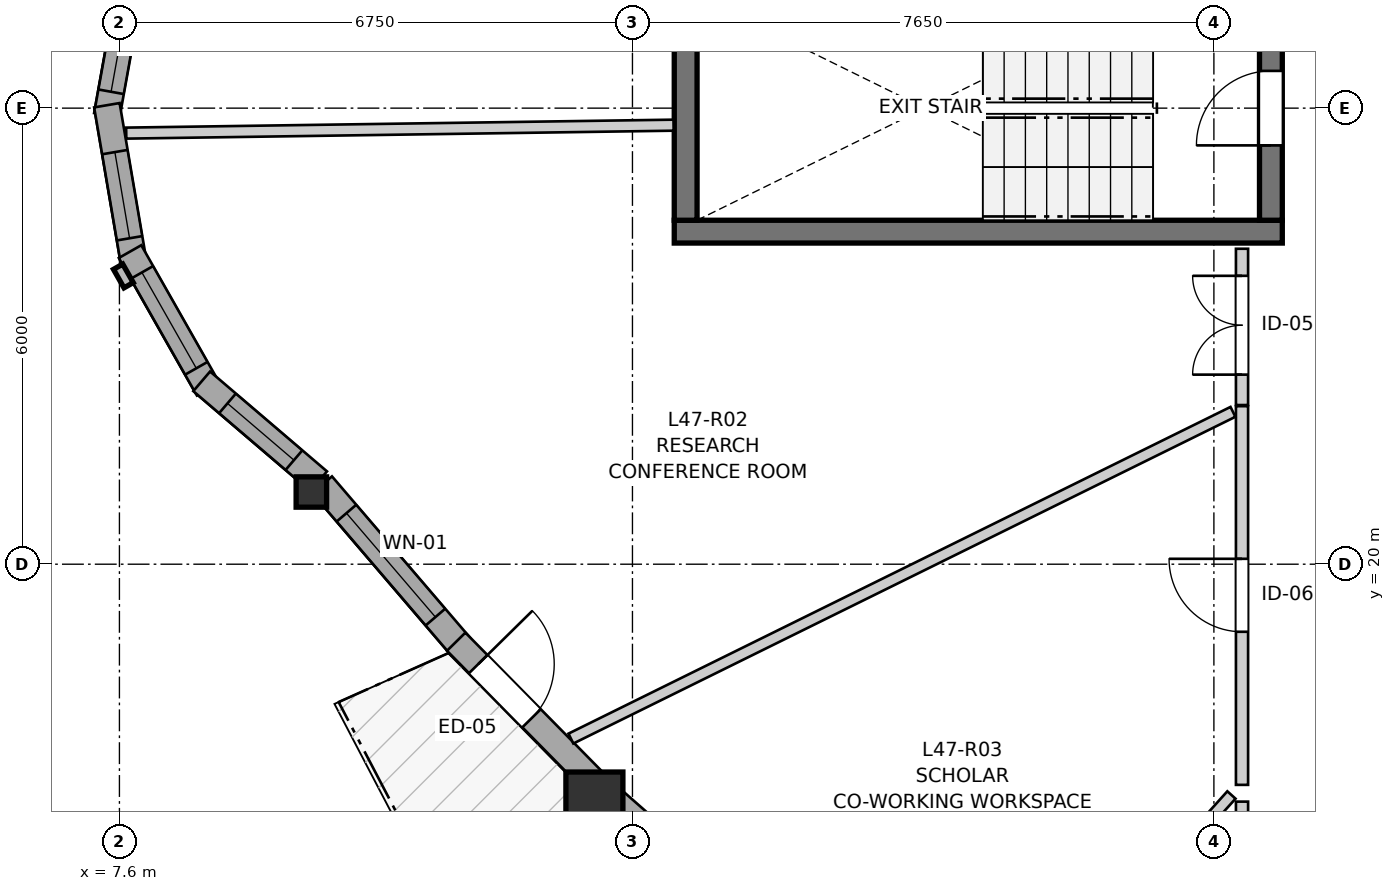
"""IFC4 building model, lengths in metres.
Left out: names, types, materials, properties, quantities, classifications, styles, units other than length and angle.
Written with IfcOpenShell. Run it as: python <this file> out.ifc"""

import sys

from ifc_helpers import new_model, si_unit, direction, frame, frame_2d, origin, origin_2d, place, context, subcontext, project, spatial, rectangle, i_section, extrude, source, transform, mapped, element, fill, save


model = new_model("IFC4")
c1 = context("Model", 3, precision=1e-05, world=origin(), true_north=direction((0.0, 1.0)))
c2 = subcontext(c1, "Body", "Model", "MODEL_VIEW")
j1 = project(units=[si_unit("LENGTHUNIT", "METRE"), si_unit("PLANEANGLEUNIT", "RADIAN")], contexts=[c1])
p1 = place(None, origin())
s1 = spatial("IfcSite", under=j1, at=p1, CompositionType="ELEMENT")
p2 = place(p1, origin())
s2 = spatial("IfcBuilding", under=s1, at=p2, CompositionType="ELEMENT")
p3 = place(p2, frame((0.0, 0.0, 158.6)))
s3 = spatial("IfcBuildingStorey", under=s2, at=p3, CompositionType="ELEMENT", Elevation=158.6)
p4 = place(p3, frame((14.9, 24.375, 0.0), z_axis=(0.0, 0.0, 1.0), x_axis=(1.0, 0.0, 0.0)))
e1 = element("IfcWall", 1, at=p4, inside=s3, PredefinedType="SHEAR", context=c2, shape_type="SweptSolid", body=[
    extrude(rectangle(XDim=8.0, YDim=0.3, at=frame_2d((4.0, 0.0))), origin(), (0.0, 0.0, 1.0), 2.95),
])
p5 = place(p3, frame((15.05, 27.475, 0.0), z_axis=(0.0, 0.0, 1.0), x_axis=(0.0, -1.0, 0.0)))
e2 = element("IfcWall", 2, at=p5, inside=s3, PredefinedType="SHEAR", context=c2, shape_type="SweptSolid", body=[
    extrude(rectangle(XDim=2.95, YDim=0.3, at=frame_2d((1.475, 0.0))), origin(), (0.0, 0.0, 1.0), 2.95),
])
p6 = place(p3, frame((22.75, 24.525, 0.0), z_axis=(0.0, 0.0, 1.0), x_axis=(0.0, 1.0, 0.0)))
e3 = element("IfcWall", 3, at=p6, inside=s3, PredefinedType="SHEAR", context=c2, shape_type="SweptSolid", body=[
    extrude(rectangle(XDim=2.95, YDim=0.3, at=frame_2d((1.475, 0.0))), origin(), (0.0, 0.0, 1.0), 2.95),
])
p7 = place(p6, frame((0.985, 0.0, 0.0)))
e4 = element("IfcOpeningElement", 4, at=p7, cuts=e3, PredefinedType="OPENING", context=c2, shape_type="SweptSolid", body=[
    extrude(rectangle(XDim=0.98, YDim=2.15, at=frame_2d((0.49, 1.075))), frame((0.0, 0.16, 0.0), z_axis=(0.0, -1.0, 0.0), x_axis=(1.0, 0.0, 0.0)), (0.0, 0.0, 1.0), 0.32),
])
m1 = source(origin(), c2, "Body", "SweptSolid", [
    extrude(i_section(OverallWidth=0.401, OverallDepth=0.399, WebThickness=0.023, FlangeThickness=0.036, FilletRadius=0.015, at=origin_2d()), origin(), (0.0, 0.0, 1.0), 2.95),
])
p8 = place(p3, frame((10.125, 20.95, 0.0), z_axis=(0.0, 0.0, 1.0), x_axis=(1.0, 0.0, 0.0)))
e5 = element("IfcColumn", 5, at=p8, inside=s3, PredefinedType="PILASTER", context=c2, shape_type="MappedRepresentation", body=[
    mapped(m1, transform((0.0, 0.0, 0.0), x_axis=(1.0, 0.0, 0.0), y_axis=(0.0, 1.0, 0.0), z_axis=(0.0, 0.0, 1.0), scale=1.0)),
])
m2 = source(origin(), c2, "Body", "SweptSolid", [
    extrude(rectangle(XDim=0.75, YDim=0.75, at=origin_2d()), origin(), (0.0, 0.0, 1.0), 2.95),
])
p9 = place(p3, frame((13.849, 16.891, 0.0), z_axis=(0.0, 0.0, 1.0), x_axis=(1.0, 0.0, 0.0)))
e6 = element("IfcColumn", 6, at=p9, inside=s3, PredefinedType="COLUMN", context=c2, shape_type="MappedRepresentation", body=[
    mapped(m2, transform((0.0, 0.0, 0.0), x_axis=(1.0, 0.0, 0.0), y_axis=(0.0, 1.0, 0.0), z_axis=(0.0, 0.0, 1.0), scale=1.0)),
])
p10 = place(p3, frame((7.804, 27.953, 0.0), z_axis=(0.0, 0.0, 1.0), x_axis=(-0.177605215389, -0.984101817632, 0.0)))
e7 = element("IfcWall", 7, at=p10, inside=s3, PredefinedType="SOLIDWALL", context=c2, shape_type="SweptSolid", body=[
    extrude(rectangle(XDim=2.081, YDim=0.34, at=frame_2d((1.041, 0.0))), origin(), (0.0, 0.0, 1.0), 2.53),
])
p11 = place(p10, frame((0.316, 0.0, 0.82)))
e8 = element("IfcOpeningElement", 8, at=p11, cuts=e7, PredefinedType="OPENING", context=c2, shape_type="SweptSolid", body=[
    extrude(rectangle(XDim=1.45, YDim=1.25, at=frame_2d((0.725, 0.625))), frame((0.0, 0.18, 0.0), z_axis=(0.0, -1.0, 0.0), x_axis=(1.0, 0.0, 0.0)), (0.0, 0.0, 1.0), 0.36),
])
p12 = place(p3, frame((7.435, 26.038, 0.0), z_axis=(0.0, 0.0, 1.0), x_axis=(0.168107405166, -0.985768685001, 0.0)))
e9 = element("IfcWall", 9, at=p12, inside=s3, PredefinedType="SOLIDWALL", context=c2, shape_type="SweptSolid", body=[
    extrude(rectangle(XDim=2.081, YDim=0.34, at=frame_2d((1.041, 0.0))), origin(), (0.0, 0.0, 1.0), 2.53),
])
p13 = place(p12, frame((0.625, 0.0, 0.82)))
e10 = element("IfcOpeningElement", 10, at=p13, cuts=e9, PredefinedType="OPENING", context=c2, shape_type="SweptSolid", body=[
    extrude(rectangle(XDim=1.15, YDim=1.2, at=frame_2d((0.575, 0.6))), frame((0.0, 0.18, 0.0), z_axis=(0.0, -1.0, 0.0), x_axis=(1.0, 0.0, 0.0)), (0.0, 0.0, 1.0), 0.36),
])
p14 = place(p3, frame((7.74, 24.113, 0.0), z_axis=(0.0, 0.0, 1.0), x_axis=(0.493660675866, -0.869654607936, 0.0)))
e11 = element("IfcWall", 11, at=p14, inside=s3, PredefinedType="SOLIDWALL", context=c2, shape_type="SweptSolid", body=[
    extrude(rectangle(XDim=2.081, YDim=0.34, at=frame_2d((1.041, 0.0))), origin(), (0.0, 0.0, 1.0), 2.53),
])
p15 = place(p14, frame((0.316, 0.0, 0.82)))
e12 = element("IfcOpeningElement", 12, at=p15, cuts=e11, PredefinedType="OPENING", context=c2, shape_type="SweptSolid", body=[
    extrude(rectangle(XDim=1.45, YDim=1.25, at=frame_2d((0.725, 0.625))), frame((0.0, 0.18, 0.0), z_axis=(0.0, -1.0, 0.0), x_axis=(1.0, 0.0, 0.0)), (0.0, 0.0, 1.0), 0.36),
])
p16 = place(p3, frame((8.682, 22.406, 0.0), z_axis=(0.0, 0.0, 1.0), x_axis=(0.760269373804, -0.649607942728, 0.0)))
e13 = element("IfcWall", 13, at=p16, inside=s3, PredefinedType="SOLIDWALL", context=c2, shape_type="SweptSolid", body=[
    extrude(rectangle(XDim=2.023, YDim=0.34, at=frame_2d((1.012, 0.0))), origin(), (0.0, 0.0, 1.0), 2.53),
])
p17 = place(p16, frame((0.447, 0.0, 0.82)))
e14 = element("IfcOpeningElement", 14, at=p17, cuts=e13, PredefinedType="OPENING", context=c2, shape_type="SweptSolid", body=[
    extrude(rectangle(XDim=1.15, YDim=1.2, at=frame_2d((0.575, 0.6))), frame((0.0, 0.18, 0.0), z_axis=(0.0, -1.0, 0.0), x_axis=(1.0, 0.0, 0.0)), (0.0, 0.0, 1.0), 0.36),
])
p18 = place(p3, frame((10.267, 21.045, 0.0), z_axis=(0.0, 0.0, 1.0), x_axis=(0.650339388137, -0.759643785098, 0.0)))
e15 = element("IfcWall", 15, at=p18, inside=s3, PredefinedType="SOLIDWALL", context=c2, shape_type="SweptSolid", body=[
    extrude(rectangle(XDim=2.803, YDim=0.34, at=frame_2d((1.402, 0.0))), origin(), (0.0, 0.0, 1.0), 2.53),
])
p19 = place(p18, frame((0.491, 0.0, 0.82)))
e16 = element("IfcOpeningElement", 16, at=p19, cuts=e15, PredefinedType="OPENING", context=c2, shape_type="SweptSolid", body=[
    extrude(rectangle(XDim=1.8, YDim=1.45, at=frame_2d((0.9, 0.725))), frame((0.0, 0.18, 0.0), z_axis=(0.0, -1.0, 0.0), x_axis=(1.0, 0.0, 0.0)), (0.0, 0.0, 1.0), 0.36),
])
p20 = place(p3, frame((12.031, 18.98, 0.0), z_axis=(0.0, 0.0, 1.0), x_axis=(0.701518749222, -0.712650997677, 0.0)))
e17 = element("IfcWall", 17, at=p20, inside=s3, PredefinedType="SOLIDWALL", context=c2, shape_type="SweptSolid", body=[
    extrude(rectangle(XDim=2.61, YDim=0.34, at=frame_2d((1.305, 0.0))), origin(), (0.0, 0.0, 1.0), 2.53),
])
p21 = place(p20, frame((0.413, 0.0, 0.0)))
e18 = element("IfcOpeningElement", 18, at=p21, cuts=e17, PredefinedType="OPENING", context=c2, shape_type="SweptSolid", body=[
    extrude(rectangle(XDim=1.0, YDim=2.1, at=frame_2d((0.5, 1.05))), frame((0.0, 0.18, 0.0), z_axis=(0.0, -1.0, 0.0), x_axis=(1.0, 0.0, 0.0)), (0.0, 0.0, 1.0), 0.36),
])
p22 = place(p3, frame((14.078, 16.916, 0.0), z_axis=(0.0, 0.0, 1.0), x_axis=(0.751177768463, -0.660099962253, 0.0)))
e19 = element("IfcWall", 19, at=p22, inside=s3, PredefinedType="SOLIDWALL", context=c2, shape_type="SweptSolid", body=[
    extrude(rectangle(XDim=2.565, YDim=0.34, at=frame_2d((1.283, 0.0))), origin(), (0.0, 0.0, 1.0), 2.53),
])
p23 = place(p22, frame((0.528, 0.0, 0.82)))
e20 = element("IfcOpeningElement", 20, at=p23, cuts=e19, PredefinedType="OPENING", context=c2, shape_type="SweptSolid", body=[
    extrude(rectangle(XDim=1.5, YDim=1.45, at=frame_2d((0.75, 0.725))), frame((0.0, 0.18, 0.0), z_axis=(0.0, -1.0, 0.0), x_axis=(1.0, 0.0, 0.0)), (0.0, 0.0, 1.0), 0.36),
])
p24 = place(p3, frame((22.37, 17.097, 0.0), z_axis=(0.0, 0.0, 1.0), x_axis=(0.0, 1.0, 0.0)))
e21 = element("IfcWall", 21, at=p24, inside=s3, PredefinedType="PARTITIONING", context=c2, shape_type="SweptSolid", body=[
    extrude(rectangle(XDim=4.982, YDim=0.16, at=frame_2d((2.491, 0.0))), origin(), (0.0, 0.0, 1.0), 2.95),
])
p25 = place(p24, frame((2.014, 0.0, 0.0)))
e22 = element("IfcOpeningElement", 22, at=p25, cuts=e21, PredefinedType="OPENING", context=c2, shape_type="SweptSolid", body=[
    extrude(rectangle(XDim=0.96, YDim=2.1, at=frame_2d((0.48, 1.05))), frame((0.0, 0.09, 0.0), z_axis=(0.0, -1.0, 0.0), x_axis=(1.0, 0.0, 0.0)), (0.0, 0.0, 1.0), 0.18),
])
p26 = place(p3, frame((22.37, 22.094, 0.0), z_axis=(0.0, 0.0, 1.0), x_axis=(0.0, 1.0, 0.0)))
e23 = element("IfcWall", 23, at=p26, inside=s3, PredefinedType="PARTITIONING", context=c2, shape_type="SweptSolid", body=[
    extrude(rectangle(XDim=2.056, YDim=0.16, at=frame_2d((1.028, 0.0))), origin(), (0.0, 0.0, 1.0), 2.95),
])
p27 = place(p26, frame((0.4, 0.0, 0.0)))
e24 = element("IfcOpeningElement", 24, at=p27, cuts=e23, PredefinedType="OPENING", context=c2, shape_type="SweptSolid", body=[
    extrude(rectangle(XDim=1.3, YDim=2.1, at=frame_2d((0.65, 1.05))), frame((0.0, 0.09, 0.0), z_axis=(0.0, -1.0, 0.0), x_axis=(1.0, 0.0, 0.0)), (0.0, 0.0, 1.0), 0.18),
])
p28 = place(p3, frame((13.54, 17.706, 0.0), z_axis=(0.0, 0.0, 1.0), x_axis=(0.896762400541, 0.442512369291, 0.0)))
e25 = element("IfcWall", 25, at=p28, inside=s3, PredefinedType="PARTITIONING", context=c2, shape_type="SweptSolid", body=[
    extrude(rectangle(XDim=9.713, YDim=0.145, at=frame_2d((4.857, 0.0))), origin(), (0.0, 0.0, 1.0), 2.95),
])
p29 = place(p3, frame((7.689, 25.671, 0.0), z_axis=(0.0, 0.0, 1.0), x_axis=(0.999894747293, 0.014508422953, 0.0)))
e26 = element("IfcWall", 26, at=p29, inside=s3, PredefinedType="PARTITIONING", context=c2, shape_type="SweptSolid", body=[
    extrude(rectangle(XDim=7.202, YDim=0.145, at=frame_2d((3.601, 0.0))), origin(), (0.0, 0.0, 1.0), 2.95),
])
p30 = place(p3, frame((18.957, 13.322, 0.0), z_axis=(0.0, 0.0, 1.0), x_axis=(0.66841369867, 0.743789706456, 0.0)))
e27 = element("IfcWall", 27, at=p30, inside=s3, PredefinedType="PARTITIONING", context=c2, shape_type="SweptSolid", body=[
    extrude(rectangle(XDim=4.897, YDim=0.145, at=frame_2d((2.449, 0.0))), origin(), (0.0, 0.0, 1.0), 2.95),
])
p31 = place(p3, frame((22.37, 14.538, 0.0), z_axis=(0.0, 0.0, 1.0), x_axis=(0.0, 1.0, 0.0)))
e28 = element("IfcWall", 28, at=p31, inside=s3, PredefinedType="PARTITIONING", context=c2, shape_type="SweptSolid", body=[
    extrude(rectangle(XDim=2.338, YDim=0.16, at=frame_2d((1.169, 0.0))), origin(), (0.0, 0.0, 1.0), 2.95),
])
m3 = source(origin(), c2, "Body", "SweptSolid", [
    extrude(rectangle(XDim=1.45, YDim=1.25, at=frame_2d((0.725, 0.625))), frame((0.0, 0.03, 0.0), z_axis=(0.0, -1.0, 0.0), x_axis=(1.0, 0.0, 0.0)), (0.0, 0.0, 1.0), 0.06),
])
p32 = place(p11, origin())
e29 = element("IfcWindow", 29, at=p32, inside=s3, PartitioningType="SINGLE_PANEL", PredefinedType="WINDOW", context=c2, shape_type="MappedRepresentation", body=[
    mapped(m3, transform((0.0, 0.0, 0.0), x_axis=(1.0, 0.0, 0.0), y_axis=(0.0, 1.0, 0.0), z_axis=(0.0, 0.0, 1.0), scale=1.0)),
])
fill(e8, e29)
m4 = source(origin(), c2, "Body", "SweptSolid", [
    extrude(rectangle(XDim=1.15, YDim=1.2, at=frame_2d((0.575, 0.6))), frame((0.0, 0.03, 0.0), z_axis=(0.0, -1.0, 0.0), x_axis=(1.0, 0.0, 0.0)), (0.0, 0.0, 1.0), 0.06),
])
p33 = place(p13, origin())
e30 = element("IfcWindow", 30, at=p33, inside=s3, PartitioningType="SINGLE_PANEL", PredefinedType="WINDOW", context=c2, shape_type="MappedRepresentation", body=[
    mapped(m4, transform((0.0, 0.0, 0.0), x_axis=(1.0, 0.0, 0.0), y_axis=(0.0, 1.0, 0.0), z_axis=(0.0, 0.0, 1.0), scale=1.0)),
])
fill(e10, e30)
p34 = place(p15, origin())
e31 = element("IfcWindow", 31, at=p34, inside=s3, PartitioningType="SINGLE_PANEL", PredefinedType="WINDOW", context=c2, shape_type="MappedRepresentation", body=[
    mapped(m3, transform((0.0, 0.0, 0.0), x_axis=(1.0, 0.0, 0.0), y_axis=(0.0, 1.0, 0.0), z_axis=(0.0, 0.0, 1.0), scale=1.0)),
])
fill(e12, e31)
p35 = place(p17, origin())
e32 = element("IfcWindow", 32, at=p35, inside=s3, PartitioningType="SINGLE_PANEL", PredefinedType="WINDOW", context=c2, shape_type="MappedRepresentation", body=[
    mapped(m4, transform((0.0, 0.0, 0.0), x_axis=(1.0, 0.0, 0.0), y_axis=(0.0, 1.0, 0.0), z_axis=(0.0, 0.0, 1.0), scale=1.0)),
])
fill(e14, e32)
m5 = source(origin(), c2, "Body", "SweptSolid", [
    extrude(rectangle(XDim=1.8, YDim=1.45, at=frame_2d((0.9, 0.725))), frame((0.0, 0.03, 0.0), z_axis=(0.0, -1.0, 0.0), x_axis=(1.0, 0.0, 0.0)), (0.0, 0.0, 1.0), 0.06),
])
p36 = place(p19, origin())
e33 = element("IfcWindow", 33, at=p36, inside=s3, PartitioningType="SINGLE_PANEL", PredefinedType="WINDOW", context=c2, shape_type="MappedRepresentation", body=[
    mapped(m5, transform((0.0, 0.0, 0.0), x_axis=(1.0, 0.0, 0.0), y_axis=(0.0, 1.0, 0.0), z_axis=(0.0, 0.0, 1.0), scale=1.0)),
])
fill(e16, e33)
m6 = source(origin(), c2, "Body", "SweptSolid", [
    extrude(rectangle(XDim=1.0, YDim=2.1, at=frame_2d((0.5, 1.05))), frame((0.0, 0.025, 0.0), z_axis=(0.0, -1.0, 0.0), x_axis=(1.0, 0.0, 0.0)), (0.0, 0.0, 1.0), 0.05),
])
p37 = place(p21, origin())
e34 = element("IfcDoor", 34, at=p37, inside=s3, OperationType="SINGLE_SWING_LEFT", PredefinedType="DOOR", context=c2, shape_type="MappedRepresentation", body=[
    mapped(m6, transform((0.0, 0.0, 0.0), x_axis=(1.0, 0.0, 0.0), y_axis=(0.0, 1.0, 0.0), z_axis=(0.0, 0.0, 1.0), scale=1.0)),
])
fill(e18, e34)
m7 = source(origin(), c2, "Body", "SweptSolid", [
    extrude(rectangle(XDim=0.98, YDim=2.15, at=frame_2d((0.49, 1.075))), frame((0.0, 0.025, 0.0), z_axis=(0.0, -1.0, 0.0), x_axis=(1.0, 0.0, 0.0)), (0.0, 0.0, 1.0), 0.05),
])
p38 = place(p7, origin())
e35 = element("IfcDoor", 35, at=p38, inside=s3, OperationType="SINGLE_SWING_LEFT", PredefinedType="DOOR", context=c2, shape_type="MappedRepresentation", body=[
    mapped(m7, transform((0.0, 0.0, 0.0), x_axis=(1.0, 0.0, 0.0), y_axis=(0.0, 1.0, 0.0), z_axis=(0.0, 0.0, 1.0), scale=1.0)),
])
fill(e4, e35)
m8 = source(origin(), c2, "Body", "SweptSolid", [
    extrude(rectangle(XDim=0.96, YDim=2.1, at=frame_2d((0.48, 1.05))), frame((0.0, 0.025, 0.0), z_axis=(0.0, -1.0, 0.0), x_axis=(1.0, 0.0, 0.0)), (0.0, 0.0, 1.0), 0.05),
])
p39 = place(p25, origin())
e36 = element("IfcDoor", 36, at=p39, inside=s3, OperationType="SINGLE_SWING_RIGHT", PredefinedType="DOOR", context=c2, shape_type="MappedRepresentation", body=[
    mapped(m8, transform((0.0, 0.0, 0.0), x_axis=(1.0, 0.0, 0.0), y_axis=(0.0, 1.0, 0.0), z_axis=(0.0, 0.0, 1.0), scale=1.0)),
])
fill(e22, e36)
m9 = source(origin(), c2, "Body", "SweptSolid", [
    extrude(rectangle(XDim=1.3, YDim=2.1, at=frame_2d((0.65, 1.05))), frame((0.0, 0.025, 0.0), z_axis=(0.0, -1.0, 0.0), x_axis=(1.0, 0.0, 0.0)), (0.0, 0.0, 1.0), 0.05),
])
p40 = place(p27, origin())
e37 = element("IfcDoor", 37, at=p40, inside=s3, OperationType="DOUBLE_DOOR_SINGLE_SWING", PredefinedType="DOOR", context=c2, shape_type="MappedRepresentation", body=[
    mapped(m9, transform((0.0, 0.0, 0.0), x_axis=(1.0, 0.0, 0.0), y_axis=(0.0, 1.0, 0.0), z_axis=(0.0, 0.0, 1.0), scale=1.0)),
])
fill(e24, e37)
save(model, sys.argv[1])
